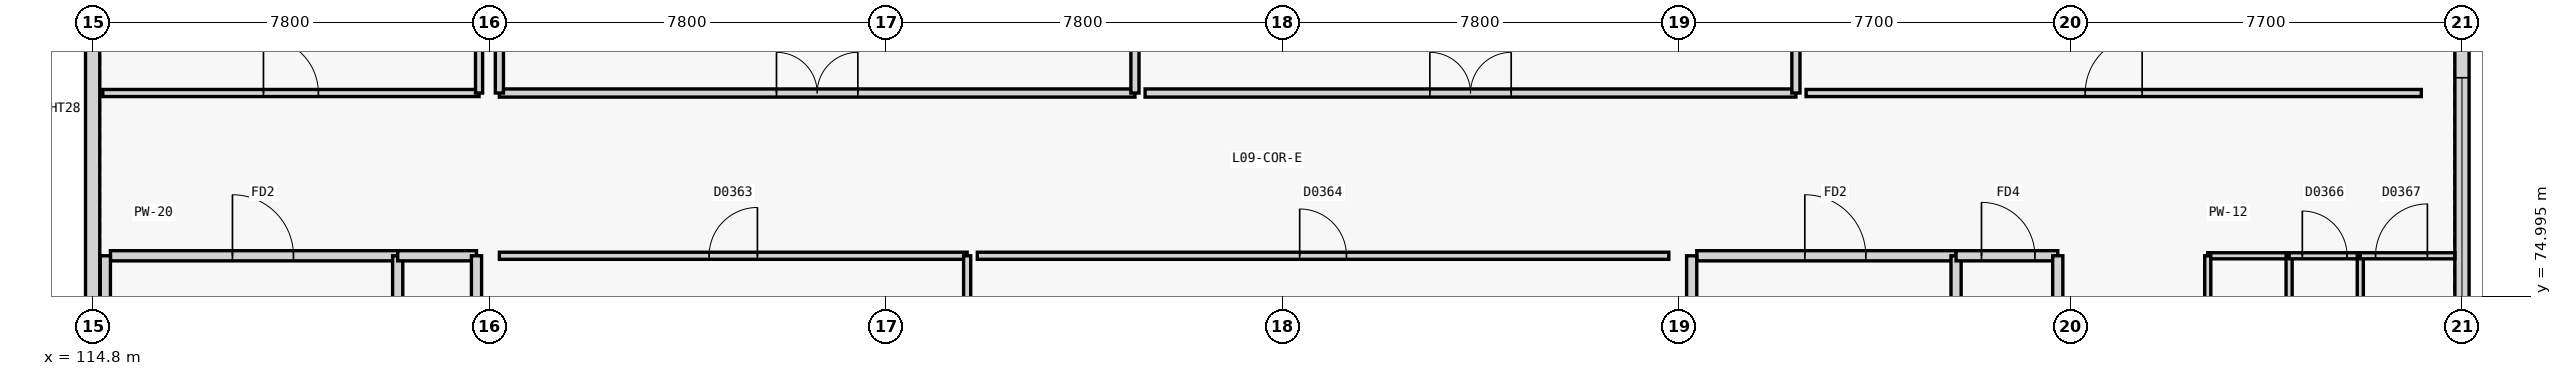
"""IFC4 building model, lengths in metres.
Left out: names, types, materials, properties, quantities, classifications, styles, units other than length and angle.
Written with IfcOpenShell. Run it as: python <this file> out.ifc"""

import sys

from ifc_helpers import new_model, si_unit, direction, frame, frame_2d, origin, place, context, subcontext, project, spatial, rectangle, extrude, element, fill, save


model = new_model("IFC4")
c1 = context("Model", 3, precision=1e-05, world=origin(), true_north=direction((0.0, 1.0)))
c2 = subcontext(c1, "Body", "Model", "MODEL_VIEW")
j1 = project(units=[si_unit("LENGTHUNIT", "METRE"), si_unit("PLANEANGLEUNIT", "RADIAN")], contexts=[c1])
p1 = place(None, origin())
s1 = spatial("IfcSite", under=j1, at=p1, CompositionType="ELEMENT")
p2 = place(p1, origin())
s2 = spatial("IfcBuilding", under=s1, at=p2, CompositionType="ELEMENT")
p3 = place(p2, frame((0.0, 0.0, 36.0)))
s3 = spatial("IfcBuildingStorey", under=s2, at=p3, CompositionType="ELEMENT", Elevation=36.0)
p4 = place(p3, frame((161.4, 96.812, 0.0), z_axis=(0.0, 0.0, 1.0), x_axis=(0.0, -1.0, 0.0)))
e1 = element("IfcWall", 1, at=p4, inside=s3, PredefinedType="SOLIDWALL", context=c2, shape_type="SweptSolid", body=[
    extrude(rectangle(XDim=32.624, YDim=0.28, at=frame_2d((16.312, 0.0))), origin(), (0.0, 0.0, 1.0), 2.8),
])
p5 = place(p4, frame((17.512, 0.0, 0.82)))
e2 = element("IfcOpeningElement", 2, at=p5, cuts=e1, PredefinedType="OPENING", context=c2, shape_type="SweptSolid", body=[
    extrude(rectangle(XDim=4.4, YDim=1.65, at=frame_2d((2.2, 0.825))), frame((0.0, 0.15, 0.0), z_axis=(0.0, -1.0, 0.0), x_axis=(1.0, 0.0, 0.0)), (0.0, 0.0, 1.0), 0.3),
])
p6 = place(p3, frame((114.8, 72.588, 0.0), z_axis=(0.0, 0.0, 1.0), x_axis=(0.0, 1.0, 0.0)))
e3 = element("IfcWall", 3, at=p6, inside=s3, PredefinedType="SOLIDWALL", context=c2, shape_type="SweptSolid", body=[
    extrude(rectangle(XDim=12.224, YDim=0.28, at=frame_2d((6.112, 0.0))), origin(), (0.0, 0.0, 1.0), 2.8),
])
p7 = place(p3, frame((115.15, 75.8, 0.0), z_axis=(0.0, 0.0, 1.0), x_axis=(1.0, 0.0, 0.0)))
e4 = element("IfcWall", 4, at=p7, inside=s3, PredefinedType="PARTITIONING", context=c2, shape_type="SweptSolid", body=[
    extrude(rectangle(XDim=5.65, YDim=0.2, at=frame_2d((2.825, 0.0))), origin(), (0.0, 0.0, 1.0), 3.32),
])
p8 = place(p7, frame((2.4, 0.0, 0.0)))
e5 = element("IfcOpeningElement", 5, at=p8, cuts=e4, PredefinedType="OPENING", context=c2, shape_type="SweptSolid", body=[
    extrude(rectangle(XDim=1.2, YDim=2.2, at=frame_2d((0.6, 1.1))), frame((0.0, 0.11, 0.0), z_axis=(0.0, -1.0, 0.0), x_axis=(1.0, 0.0, 0.0)), (0.0, 0.0, 1.0), 0.22),
])
p9 = place(p3, frame((115.05, 72.4, 0.0), z_axis=(0.0, 0.0, 1.0), x_axis=(0.0, 1.0, 0.0)))
e6 = element("IfcWall", 6, at=p9, inside=s3, PredefinedType="PARTITIONING", context=c2, shape_type="SweptSolid", body=[
    extrude(rectangle(XDim=3.4, YDim=0.2, at=frame_2d((1.7, 0.0))), origin(), (0.0, 0.0, 1.0), 2.8),
])
p10 = place(p3, frame((120.8, 72.4, 0.0), z_axis=(0.0, 0.0, 1.0), x_axis=(0.0, 1.0, 0.0)))
e7 = element("IfcWall", 7, at=p10, inside=s3, PredefinedType="PARTITIONING", context=c2, shape_type="SweptSolid", body=[
    extrude(rectangle(XDim=3.4, YDim=0.2, at=frame_2d((1.7, 0.0))), origin(), (0.0, 0.0, 1.0), 3.32),
])
p11 = place(p10, frame((1.1, 0.0, 0.0)))
e8 = element("IfcOpeningElement", 8, at=p11, cuts=e7, PredefinedType="OPENING", context=c2, shape_type="SweptSolid", body=[
    extrude(rectangle(XDim=1.2, YDim=2.2, at=frame_2d((0.6, 1.1))), frame((0.0, 0.11, 0.0), z_axis=(0.0, -1.0, 0.0), x_axis=(1.0, 0.0, 0.0)), (0.0, 0.0, 1.0), 0.22),
])
p12 = place(p3, frame((120.8, 75.8, 0.0), z_axis=(0.0, 0.0, 1.0), x_axis=(1.0, 0.0, 0.0)))
e9 = element("IfcWall", 9, at=p12, inside=s3, PredefinedType="PARTITIONING", context=c2, shape_type="SweptSolid", body=[
    extrude(rectangle(XDim=1.55, YDim=0.2, at=frame_2d((0.775, 0.0))), origin(), (0.0, 0.0, 1.0), 3.32),
])
p13 = place(p3, frame((122.35, 72.4, 0.0), z_axis=(0.0, 0.0, 1.0), x_axis=(0.0, 1.0, 0.0)))
e10 = element("IfcWall", 10, at=p13, inside=s3, PredefinedType="PARTITIONING", context=c2, shape_type="SweptSolid", body=[
    extrude(rectangle(XDim=3.4, YDim=0.2, at=frame_2d((1.7, 0.0))), origin(), (0.0, 0.0, 1.0), 2.88),
])
p14 = place(p3, frame((146.35, 75.8, 0.0), z_axis=(0.0, 0.0, 1.0), x_axis=(1.0, 0.0, 0.0)))
e11 = element("IfcWall", 11, at=p14, inside=s3, PredefinedType="PARTITIONING", context=c2, shape_type="SweptSolid", body=[
    extrude(rectangle(XDim=5.1, YDim=0.2, at=frame_2d((2.55, 0.0))), origin(), (0.0, 0.0, 1.0), 3.32),
])
p15 = place(p14, frame((2.125, 0.0, 0.0)))
e12 = element("IfcOpeningElement", 12, at=p15, cuts=e11, PredefinedType="OPENING", context=c2, shape_type="SweptSolid", body=[
    extrude(rectangle(XDim=1.2, YDim=2.2, at=frame_2d((0.6, 1.1))), frame((0.0, 0.11, 0.0), z_axis=(0.0, -1.0, 0.0), x_axis=(1.0, 0.0, 0.0)), (0.0, 0.0, 1.0), 0.22),
])
p16 = place(p3, frame((146.25, 72.4, 0.0), z_axis=(0.0, 0.0, 1.0), x_axis=(0.0, 1.0, 0.0)))
e13 = element("IfcWall", 13, at=p16, inside=s3, PredefinedType="PARTITIONING", context=c2, shape_type="SweptSolid", body=[
    extrude(rectangle(XDim=3.4, YDim=0.2, at=frame_2d((1.7, 0.0))), origin(), (0.0, 0.0, 1.0), 2.88),
])
p17 = place(p3, frame((151.45, 72.4, 0.0), z_axis=(0.0, 0.0, 1.0), x_axis=(0.0, 1.0, 0.0)))
e14 = element("IfcWall", 14, at=p17, inside=s3, PredefinedType="PARTITIONING", context=c2, shape_type="SweptSolid", body=[
    extrude(rectangle(XDim=3.4, YDim=0.2, at=frame_2d((1.7, 0.0))), origin(), (0.0, 0.0, 1.0), 3.32),
])
p18 = place(p17, frame((1.1, 0.0, 0.0)))
e15 = element("IfcOpeningElement", 15, at=p18, cuts=e14, PredefinedType="OPENING", context=c2, shape_type="SweptSolid", body=[
    extrude(rectangle(XDim=1.2, YDim=2.2, at=frame_2d((0.6, 1.1))), frame((0.0, 0.11, 0.0), z_axis=(0.0, -1.0, 0.0), x_axis=(1.0, 0.0, 0.0)), (0.0, 0.0, 1.0), 0.22),
])
p19 = place(p3, frame((151.45, 75.8, 0.0), z_axis=(0.0, 0.0, 1.0), x_axis=(1.0, 0.0, 0.0)))
e16 = element("IfcWall", 16, at=p19, inside=s3, PredefinedType="PARTITIONING", context=c2, shape_type="SweptSolid", body=[
    extrude(rectangle(XDim=2.0, YDim=0.2, at=frame_2d((1.0, 0.0))), origin(), (0.0, 0.0, 1.0), 3.32),
])
p20 = place(p19, frame((0.5, 0.0, 0.0)))
e17 = element("IfcOpeningElement", 17, at=p20, cuts=e16, PredefinedType="OPENING", context=c2, shape_type="SweptSolid", body=[
    extrude(rectangle(XDim=1.05, YDim=2.15, at=frame_2d((0.525, 1.075))), frame((0.0, 0.11, 0.0), z_axis=(0.0, -1.0, 0.0), x_axis=(1.0, 0.0, 0.0)), (0.0, 0.0, 1.0), 0.22),
])
p21 = place(p3, frame((153.45, 72.4, 0.0), z_axis=(0.0, 0.0, 1.0), x_axis=(0.0, 1.0, 0.0)))
e18 = element("IfcWall", 18, at=p21, inside=s3, PredefinedType="PARTITIONING", context=c2, shape_type="SweptSolid", body=[
    extrude(rectangle(XDim=3.4, YDim=0.2, at=frame_2d((1.7, 0.0))), origin(), (0.0, 0.0, 1.0), 2.88),
])
p22 = place(p3, frame((115.0, 79.0, 0.0), z_axis=(0.0, 0.0, 1.0), x_axis=(1.0, 0.0, 0.0)))
e19 = element("IfcWall", 19, at=p22, inside=s3, PredefinedType="PARTITIONING", context=c2, shape_type="SweptSolid", body=[
    extrude(rectangle(XDim=7.4, YDim=0.14, at=frame_2d((3.7, 0.0))), origin(), (0.0, 0.0, 1.0), 3.34),
])
p23 = place(p22, frame((3.16, 0.0, 0.0)))
e20 = element("IfcOpeningElement", 20, at=p23, cuts=e19, PredefinedType="OPENING", context=c2, shape_type="SweptSolid", body=[
    extrude(rectangle(XDim=1.08, YDim=2.2, at=frame_2d((0.54, 1.1))), frame((0.0, 0.08, 0.0), z_axis=(0.0, -1.0, 0.0), x_axis=(1.0, 0.0, 0.0)), (0.0, 0.0, 1.0), 0.16),
])
p24 = place(p3, frame((122.4, 79.0, 0.0), z_axis=(0.0, 0.0, 1.0), x_axis=(0.0, 1.0, 0.0)))
e21 = element("IfcWall", 21, at=p24, inside=s3, PredefinedType="PARTITIONING", context=c2, shape_type="SweptSolid", body=[
    extrude(rectangle(XDim=5.4, YDim=0.14, at=frame_2d((2.7, 0.0))), origin(), (0.0, 0.0, 1.0), 2.88),
])
p25 = place(p3, frame((122.8, 75.8, 0.0), z_axis=(0.0, 0.0, 1.0), x_axis=(1.0, 0.0, 0.0)))
e22 = element("IfcWall", 22, at=p25, inside=s3, PredefinedType="PARTITIONING", context=c2, shape_type="SweptSolid", body=[
    extrude(rectangle(XDim=9.2, YDim=0.14, at=frame_2d((4.6, 0.0))), origin(), (0.0, 0.0, 1.0), 3.34),
])
p26 = place(p25, frame((4.125, 0.0, 0.0)))
e23 = element("IfcOpeningElement", 23, at=p26, cuts=e22, PredefinedType="OPENING", context=c2, shape_type="SweptSolid", body=[
    extrude(rectangle(XDim=0.95, YDim=2.1, at=frame_2d((0.475, 1.05))), frame((0.0, 0.08, 0.0), z_axis=(0.0, -1.0, 0.0), x_axis=(1.0, 0.0, 0.0)), (0.0, 0.0, 1.0), 0.16),
])
p27 = place(p3, frame((132.0, 65.2, 0.0), z_axis=(0.0, 0.0, 1.0), x_axis=(0.0, 1.0, 0.0)))
e24 = element("IfcWall", 24, at=p27, inside=s3, PredefinedType="PARTITIONING", context=c2, shape_type="SweptSolid", body=[
    extrude(rectangle(XDim=10.6, YDim=0.14, at=frame_2d((5.3, 0.0))), origin(), (0.0, 0.0, 1.0), 3.34),
])
p28 = place(p3, frame((132.2, 75.8, 0.0), z_axis=(0.0, 0.0, 1.0), x_axis=(1.0, 0.0, 0.0)))
e25 = element("IfcWall", 25, at=p28, inside=s3, PredefinedType="PARTITIONING", context=c2, shape_type="SweptSolid", body=[
    extrude(rectangle(XDim=13.6, YDim=0.14, at=frame_2d((6.8, 0.0))), origin(), (0.0, 0.0, 1.0), 3.34),
])
p29 = place(p28, frame((6.34, 0.0, 0.0)))
e26 = element("IfcOpeningElement", 26, at=p29, cuts=e25, PredefinedType="OPENING", context=c2, shape_type="SweptSolid", body=[
    extrude(rectangle(XDim=0.92, YDim=2.15, at=frame_2d((0.46, 1.075))), frame((0.0, 0.08, 0.0), z_axis=(0.0, -1.0, 0.0), x_axis=(1.0, 0.0, 0.0)), (0.0, 0.0, 1.0), 0.16),
])
p30 = place(p3, frame((156.4, 75.8, 0.0), z_axis=(0.0, 0.0, 1.0), x_axis=(1.0, 0.0, 0.0)))
e27 = element("IfcWall", 27, at=p30, inside=s3, PredefinedType="PARTITIONING", context=c2, shape_type="SweptSolid", body=[
    extrude(rectangle(XDim=1.6, YDim=0.12, at=frame_2d((0.8, 0.0))), origin(), (0.0, 0.0, 1.0), 3.34),
])
p31 = place(p3, frame((156.4, 70.6, 0.0), z_axis=(0.0, 0.0, 1.0), x_axis=(0.0, 1.0, 0.0)))
e28 = element("IfcWall", 28, at=p31, inside=s3, PredefinedType="PARTITIONING", context=c2, shape_type="SweptSolid", body=[
    extrude(rectangle(XDim=5.2, YDim=0.12, at=frame_2d((2.6, 0.0))), origin(), (0.0, 0.0, 1.0), 3.34),
])
p32 = place(p31, frame((2.16, 0.0, 0.0)))
e29 = element("IfcOpeningElement", 29, at=p32, cuts=e28, PredefinedType="OPENING", context=c2, shape_type="SweptSolid", body=[
    extrude(rectangle(XDim=0.88, YDim=2.1, at=frame_2d((0.44, 1.05))), frame((0.0, 0.07, 0.0), z_axis=(0.0, -1.0, 0.0), x_axis=(1.0, 0.0, 0.0)), (0.0, 0.0, 1.0), 0.14),
])
p33 = place(p3, frame((158.0, 70.6, 0.0), z_axis=(0.0, 0.0, 1.0), x_axis=(0.0, 1.0, 0.0)))
e30 = element("IfcWall", 30, at=p33, inside=s3, PredefinedType="PARTITIONING", context=c2, shape_type="SweptSolid", body=[
    extrude(rectangle(XDim=5.2, YDim=0.12, at=frame_2d((2.6, 0.0))), origin(), (0.0, 0.0, 1.0), 3.34),
])
p34 = place(p3, frame((158.0, 75.8, 0.0), z_axis=(0.0, 0.0, 1.0), x_axis=(1.0, 0.0, 0.0)))
e31 = element("IfcWall", 31, at=p34, inside=s3, PredefinedType="PARTITIONING", context=c2, shape_type="SweptSolid", body=[
    extrude(rectangle(XDim=1.4, YDim=0.12, at=frame_2d((0.7, 0.0))), origin(), (0.0, 0.0, 1.0), 3.34),
])
p35 = place(p34, frame((0.26, 0.0, 0.0)))
e32 = element("IfcOpeningElement", 32, at=p35, cuts=e31, PredefinedType="OPENING", context=c2, shape_type="SweptSolid", body=[
    extrude(rectangle(XDim=0.88, YDim=2.1, at=frame_2d((0.44, 1.05))), frame((0.0, 0.07, 0.0), z_axis=(0.0, -1.0, 0.0), x_axis=(1.0, 0.0, 0.0)), (0.0, 0.0, 1.0), 0.14),
])
p36 = place(p3, frame((159.4, 70.6, 0.0), z_axis=(0.0, 0.0, 1.0), x_axis=(0.0, 1.0, 0.0)))
e33 = element("IfcWall", 33, at=p36, inside=s3, PredefinedType="PARTITIONING", context=c2, shape_type="SweptSolid", body=[
    extrude(rectangle(XDim=5.2, YDim=0.12, at=frame_2d((2.6, 0.0))), origin(), (0.0, 0.0, 1.0), 3.34),
])
p37 = place(p3, frame((159.4, 75.8, 0.0), z_axis=(0.0, 0.0, 1.0), x_axis=(1.0, 0.0, 0.0)))
e34 = element("IfcWall", 34, at=p37, inside=s3, PredefinedType="PARTITIONING", context=c2, shape_type="SweptSolid", body=[
    extrude(rectangle(XDim=1.86, YDim=0.12, at=frame_2d((0.93, 0.0))), origin(), (0.0, 0.0, 1.0), 3.34),
])
p38 = place(p37, frame((0.3, 0.0, 0.0)))
e35 = element("IfcOpeningElement", 35, at=p38, cuts=e34, PredefinedType="OPENING", context=c2, shape_type="SweptSolid", body=[
    extrude(rectangle(XDim=1.02, YDim=2.1, at=frame_2d((0.51, 1.05))), frame((0.0, 0.07, 0.0), z_axis=(0.0, -1.0, 0.0), x_axis=(1.0, 0.0, 0.0)), (0.0, 0.0, 1.0), 0.14),
])
p39 = place(p3, frame((122.8, 79.0, 0.0), z_axis=(0.0, 0.0, 1.0), x_axis=(1.0, 0.0, 0.0)))
e36 = element("IfcWall", 36, at=p39, inside=s3, PredefinedType="PARTITIONING", context=c2, shape_type="SweptSolid", body=[
    extrude(rectangle(XDim=12.5, YDim=0.16, at=frame_2d((6.25, 0.0))), origin(), (0.0, 0.0, 1.0), 3.34),
])
p40 = place(p39, frame((5.45, 0.0, 0.0)))
e37 = element("IfcOpeningElement", 37, at=p40, cuts=e36, PredefinedType="OPENING", context=c2, shape_type="SweptSolid", body=[
    extrude(rectangle(XDim=1.6, YDim=2.2, at=frame_2d((0.8, 1.1))), frame((0.0, 0.09, 0.0), z_axis=(0.0, -1.0, 0.0), x_axis=(1.0, 0.0, 0.0)), (0.0, 0.0, 1.0), 0.18),
])
p41 = place(p3, frame((122.8, 79.0, 0.0), z_axis=(0.0, 0.0, 1.0), x_axis=(0.0, 1.0, 0.0)))
e38 = element("IfcWall", 38, at=p41, inside=s3, PredefinedType="PARTITIONING", context=c2, shape_type="SweptSolid", body=[
    extrude(rectangle(XDim=17.6, YDim=0.16, at=frame_2d((8.8, 0.0))), origin(), (0.0, 0.0, 1.0), 2.88),
])
p42 = place(p3, frame((135.3, 79.0, 0.0), z_axis=(0.0, 0.0, 1.0), x_axis=(0.0, 1.0, 0.0)))
e39 = element("IfcWall", 39, at=p42, inside=s3, PredefinedType="PARTITIONING", context=c2, shape_type="SweptSolid", body=[
    extrude(rectangle(XDim=17.6, YDim=0.16, at=frame_2d((8.8, 0.0))), origin(), (0.0, 0.0, 1.0), 3.34),
])
p43 = place(p3, frame((135.5, 79.0, 0.0), z_axis=(0.0, 0.0, 1.0), x_axis=(1.0, 0.0, 0.0)))
e40 = element("IfcWall", 40, at=p43, inside=s3, PredefinedType="PARTITIONING", context=c2, shape_type="SweptSolid", body=[
    extrude(rectangle(XDim=12.8, YDim=0.16, at=frame_2d((6.4, 0.0))), origin(), (0.0, 0.0, 1.0), 3.34),
])
p44 = place(p43, frame((5.6, 0.0, 0.0)))
e41 = element("IfcOpeningElement", 41, at=p44, cuts=e40, PredefinedType="OPENING", context=c2, shape_type="SweptSolid", body=[
    extrude(rectangle(XDim=1.6, YDim=2.2, at=frame_2d((0.8, 1.1))), frame((0.0, 0.09, 0.0), z_axis=(0.0, -1.0, 0.0), x_axis=(1.0, 0.0, 0.0)), (0.0, 0.0, 1.0), 0.18),
])
p45 = place(p3, frame((148.3, 79.0, 0.0), z_axis=(0.0, 0.0, 1.0), x_axis=(0.0, 1.0, 0.0)))
e42 = element("IfcWall", 42, at=p45, inside=s3, PredefinedType="PARTITIONING", context=c2, shape_type="SweptSolid", body=[
    extrude(rectangle(XDim=17.6, YDim=0.16, at=frame_2d((8.8, 0.0))), origin(), (0.0, 0.0, 1.0), 3.34),
])
p46 = place(p3, frame((148.5, 79.0, 0.0), z_axis=(0.0, 0.0, 1.0), x_axis=(1.0, 0.0, 0.0)))
e43 = element("IfcWall", 43, at=p46, inside=s3, PredefinedType="PARTITIONING", context=c2, shape_type="SweptSolid", body=[
    extrude(rectangle(XDim=12.1, YDim=0.14, at=frame_2d((6.05, 0.0))), origin(), (0.0, 0.0, 1.0), 3.34),
])
p47 = place(p46, frame((5.49, 0.0, 0.0)))
e44 = element("IfcOpeningElement", 44, at=p47, cuts=e43, PredefinedType="OPENING", context=c2, shape_type="SweptSolid", body=[
    extrude(rectangle(XDim=1.12, YDim=2.15, at=frame_2d((0.56, 1.075))), frame((0.0, 0.08, 0.0), z_axis=(0.0, -1.0, 0.0), x_axis=(1.0, 0.0, 0.0)), (0.0, 0.0, 1.0), 0.16),
])
p48 = place(p5, origin())
e45 = element("IfcWindow", 45, at=p48, inside=s3, PartitioningType="SINGLE_PANEL", PredefinedType="WINDOW", context=c2, shape_type="SweptSolid", body=[
    extrude(rectangle(XDim=4.4, YDim=1.65, at=frame_2d((2.2, 0.825))), frame((0.0, 0.03, 0.0), z_axis=(0.0, -1.0, 0.0), x_axis=(1.0, 0.0, 0.0)), (0.0, 0.0, 1.0), 0.06),
])
fill(e2, e45)
p49 = place(p8, origin())
e46 = element("IfcDoor", 46, at=p49, inside=s3, OperationType="SINGLE_SWING_LEFT", PredefinedType="DOOR", context=c2, shape_type="SweptSolid", body=[
    extrude(rectangle(XDim=1.2, YDim=2.2, at=frame_2d((0.6, 1.1))), frame((0.0, 0.025, 0.0), z_axis=(0.0, -1.0, 0.0), x_axis=(1.0, 0.0, 0.0)), (0.0, 0.0, 1.0), 0.05),
])
fill(e5, e46)
p50 = place(p15, origin())
e47 = element("IfcDoor", 47, at=p50, inside=s3, OperationType="SINGLE_SWING_LEFT", PredefinedType="DOOR", context=c2, shape_type="SweptSolid", body=[
    extrude(rectangle(XDim=1.2, YDim=2.2, at=frame_2d((0.6, 1.1))), frame((0.0, 0.025, 0.0), z_axis=(0.0, -1.0, 0.0), x_axis=(1.0, 0.0, 0.0)), (0.0, 0.0, 1.0), 0.05),
])
fill(e12, e47)
p51 = place(p20, origin())
e48 = element("IfcDoor", 48, at=p51, inside=s3, OperationType="SINGLE_SWING_LEFT", PredefinedType="DOOR", context=c2, shape_type="SweptSolid", body=[
    extrude(rectangle(XDim=1.05, YDim=2.15, at=frame_2d((0.525, 1.075))), frame((0.0, 0.025, 0.0), z_axis=(0.0, -1.0, 0.0), x_axis=(1.0, 0.0, 0.0)), (0.0, 0.0, 1.0), 0.05),
])
fill(e17, e48)
p52 = place(p23, origin())
e49 = element("IfcDoor", 49, at=p52, inside=s3, OperationType="SINGLE_SWING_LEFT", PredefinedType="DOOR", context=c2, shape_type="SweptSolid", body=[
    extrude(rectangle(XDim=1.08, YDim=2.2, at=frame_2d((0.54, 1.1))), frame((0.0, 0.025, 0.0), z_axis=(0.0, -1.0, 0.0), x_axis=(1.0, 0.0, 0.0)), (0.0, 0.0, 1.0), 0.05),
])
fill(e20, e49)
p53 = place(p26, origin())
e50 = element("IfcDoor", 50, at=p53, inside=s3, OperationType="SINGLE_SWING_RIGHT", PredefinedType="DOOR", context=c2, shape_type="SweptSolid", body=[
    extrude(rectangle(XDim=0.95, YDim=2.1, at=frame_2d((0.475, 1.05))), frame((0.0, 0.025, 0.0), z_axis=(0.0, -1.0, 0.0), x_axis=(1.0, 0.0, 0.0)), (0.0, 0.0, 1.0), 0.05),
])
fill(e23, e50)
p54 = place(p29, origin())
e51 = element("IfcDoor", 51, at=p54, inside=s3, OperationType="SINGLE_SWING_LEFT", PredefinedType="DOOR", context=c2, shape_type="SweptSolid", body=[
    extrude(rectangle(XDim=0.92, YDim=2.15, at=frame_2d((0.46, 1.075))), frame((0.0, 0.025, 0.0), z_axis=(0.0, -1.0, 0.0), x_axis=(1.0, 0.0, 0.0)), (0.0, 0.0, 1.0), 0.05),
])
fill(e26, e51)
p55 = place(p35, origin())
e52 = element("IfcDoor", 52, at=p55, inside=s3, OperationType="SINGLE_SWING_LEFT", PredefinedType="DOOR", context=c2, shape_type="SweptSolid", body=[
    extrude(rectangle(XDim=0.88, YDim=2.1, at=frame_2d((0.44, 1.05))), frame((0.0, 0.025, 0.0), z_axis=(0.0, -1.0, 0.0), x_axis=(1.0, 0.0, 0.0)), (0.0, 0.0, 1.0), 0.05),
])
fill(e32, e52)
p56 = place(p38, origin())
e53 = element("IfcDoor", 53, at=p56, inside=s3, OperationType="SINGLE_SWING_RIGHT", PredefinedType="DOOR", context=c2, shape_type="SweptSolid", body=[
    extrude(rectangle(XDim=1.02, YDim=2.1, at=frame_2d((0.51, 1.05))), frame((0.0, 0.025, 0.0), z_axis=(0.0, -1.0, 0.0), x_axis=(1.0, 0.0, 0.0)), (0.0, 0.0, 1.0), 0.05),
])
fill(e35, e53)
p57 = place(p40, origin())
e54 = element("IfcDoor", 54, at=p57, inside=s3, OperationType="DOUBLE_DOOR_SINGLE_SWING", PredefinedType="DOOR", context=c2, shape_type="SweptSolid", body=[
    extrude(rectangle(XDim=1.6, YDim=2.2, at=frame_2d((0.8, 1.1))), frame((0.0, 0.025, 0.0), z_axis=(0.0, -1.0, 0.0), x_axis=(1.0, 0.0, 0.0)), (0.0, 0.0, 1.0), 0.05),
])
fill(e37, e54)
p58 = place(p44, origin())
e55 = element("IfcDoor", 55, at=p58, inside=s3, OperationType="DOUBLE_DOOR_SINGLE_SWING", PredefinedType="DOOR", context=c2, shape_type="SweptSolid", body=[
    extrude(rectangle(XDim=1.6, YDim=2.2, at=frame_2d((0.8, 1.1))), frame((0.0, 0.025, 0.0), z_axis=(0.0, -1.0, 0.0), x_axis=(1.0, 0.0, 0.0)), (0.0, 0.0, 1.0), 0.05),
])
fill(e41, e55)
p59 = place(p47, origin())
e56 = element("IfcDoor", 56, at=p59, inside=s3, OperationType="SINGLE_SWING_RIGHT", PredefinedType="DOOR", context=c2, shape_type="SweptSolid", body=[
    extrude(rectangle(XDim=1.12, YDim=2.15, at=frame_2d((0.56, 1.075))), frame((0.0, 0.025, 0.0), z_axis=(0.0, -1.0, 0.0), x_axis=(1.0, 0.0, 0.0)), (0.0, 0.0, 1.0), 0.05),
])
fill(e44, e56)
save(model, sys.argv[1])
